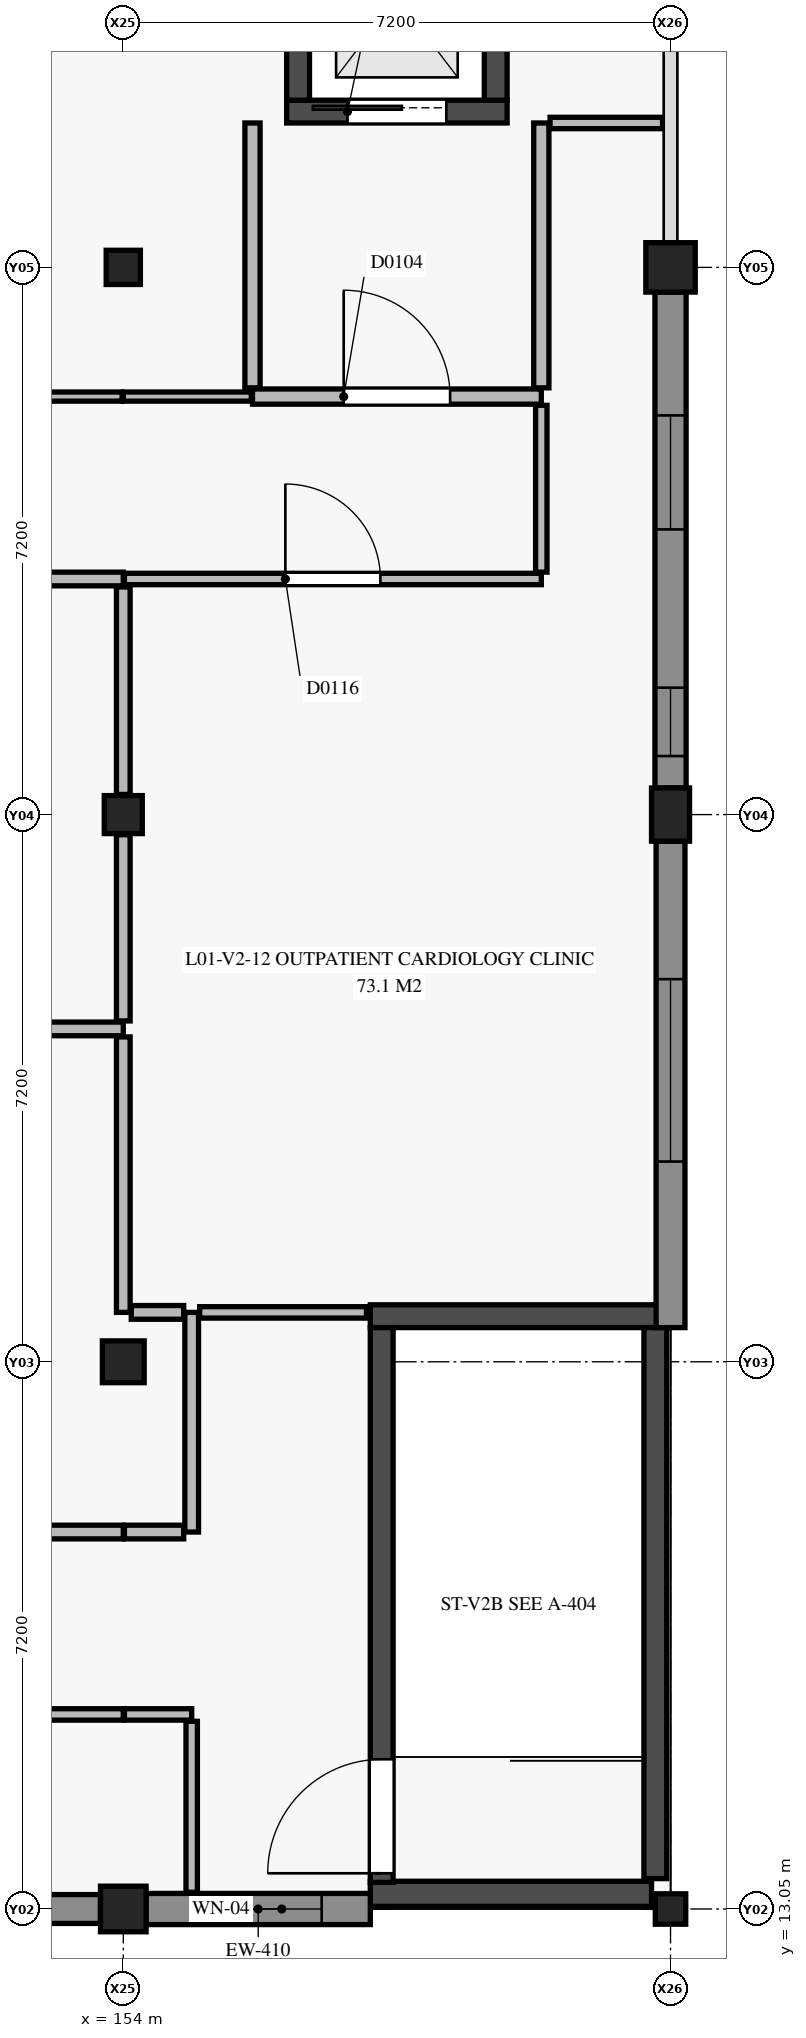
"""IFC4 building model, lengths in metres.
Left out: names, types, materials, properties, quantities, classifications, styles, units other than length and angle.
Written with IfcOpenShell. Run it as: python <this file> out.ifc"""

import sys

from ifc_helpers import new_model, si_unit, direction, frame, frame_2d, origin, origin_2d, place, context, subcontext, project, spatial, rectangle, circle, extrude, element, fill, save


model = new_model("IFC4")
c1 = context("Model", 3, precision=1e-05, world=origin(), true_north=direction((0.0, 1.0)))
c2 = subcontext(c1, "Body", "Model", "MODEL_VIEW")
j1 = project(units=[si_unit("LENGTHUNIT", "METRE"), si_unit("PLANEANGLEUNIT", "RADIAN")], contexts=[c1])
p1 = place(None, origin())
s1 = spatial("IfcSite", under=j1, at=p1, CompositionType="ELEMENT")
p2 = place(p1, origin())
s2 = spatial("IfcBuilding", under=s1, at=p2, CompositionType="ELEMENT")
p3 = place(p2, frame((0.0, 0.0, 4.8)))
s3 = spatial("IfcBuildingStorey", under=s2, at=p3, CompositionType="ELEMENT", Elevation=4.8)
p4 = place(p3, frame((154.0, 13.05, 0.0), z_axis=(0.0, 0.0, 1.0), x_axis=(1.0, 0.0, 0.0)))
e1 = element("IfcColumn", 1, at=p4, inside=s3, PredefinedType="COLUMN", context=c2, shape_type="SweptSolid", body=[
    extrude(rectangle(XDim=0.6, YDim=0.6, at=origin_2d()), origin(), (0.0, 0.0, 1.0), 4.36),
])
p5 = place(p3, frame((154.0, 20.25, 0.0), z_axis=(0.0, 0.0, 1.0), x_axis=(1.0, 0.0, 0.0)))
e2 = element("IfcColumn", 2, at=p5, inside=s3, PredefinedType="COLUMN", context=c2, shape_type="SweptSolid", body=[
    extrude(rectangle(XDim=0.55, YDim=0.55, at=origin_2d()), origin(), (0.0, 0.0, 1.0), 4.05),
])
p6 = place(p3, frame((154.0, 27.45, 0.0), z_axis=(0.0, 0.0, 1.0), x_axis=(1.0, 0.0, 0.0)))
e3 = element("IfcColumn", 3, at=p6, inside=s3, PredefinedType="COLUMN", context=c2, shape_type="SweptSolid", body=[
    extrude(rectangle(XDim=0.5, YDim=0.5, at=origin_2d()), origin(), (0.0, 0.0, 1.0), 4.05),
])
p7 = place(p3, frame((154.0, 34.65, 0.0), z_axis=(0.0, 0.0, 1.0), x_axis=(1.0, 0.0, 0.0)))
e4 = element("IfcColumn", 4, at=p7, inside=s3, PredefinedType="COLUMN", context=c2, shape_type="SweptSolid", body=[
    extrude(rectangle(XDim=0.45, YDim=0.45, at=origin_2d()), origin(), (0.0, 0.0, 1.0), 4.05),
])
p8 = place(p3, frame((161.2, 27.45, 0.0), z_axis=(0.0, 0.0, 1.0), x_axis=(1.0, 0.0, 0.0)))
e5 = element("IfcColumn", 5, at=p8, inside=s3, PredefinedType="COLUMN", context=c2, shape_type="SweptSolid", body=[
    extrude(rectangle(XDim=0.5, YDim=0.7, at=origin_2d()), origin(), (0.0, 0.0, 1.0), 4.05),
])
p9 = place(p3, frame((161.2, 34.65, 0.0), z_axis=(0.0, 0.0, 1.0), x_axis=(1.0, 0.0, 0.0)))
e6 = element("IfcColumn", 6, at=p9, inside=s3, PredefinedType="COLUMN", context=c2, shape_type="SweptSolid", body=[
    extrude(circle(Radius=0.325, at=origin_2d()), origin(), (0.0, 0.0, 1.0), 4.05),
])
p10 = place(p3, frame((161.2, 13.05, 0.0), z_axis=(0.0, 0.0, 1.0), x_axis=(1.0, 0.0, 0.0)))
e7 = element("IfcColumn", 7, at=p10, inside=s3, PredefinedType="COLUMN", context=c2, shape_type="SweptSolid", body=[
    extrude(rectangle(XDim=0.4, YDim=0.4, at=origin_2d()), origin(), (0.0, 0.0, 1.0), 4.36),
])
p11 = place(p3, frame((157.25, 13.25, 0.0), z_axis=(0.0, 0.0, 1.0), x_axis=(1.0, 0.0, 0.0)))
e8 = element("IfcWall", 8, at=p11, inside=s3, PredefinedType="SHEAR", context=c2, shape_type="SweptSolid", body=[
    extrude(rectangle(XDim=3.7, YDim=0.33, at=frame_2d((1.85, 0.0))), origin(), (0.0, 0.0, 1.0), 4.2),
])
p12 = place(p3, frame((157.25, 20.85, 0.0), z_axis=(0.0, 0.0, 1.0), x_axis=(1.0, 0.0, 0.0)))
e9 = element("IfcWall", 9, at=p12, inside=s3, PredefinedType="SHEAR", context=c2, shape_type="SweptSolid", body=[
    extrude(rectangle(XDim=3.9, YDim=0.3, at=frame_2d((1.95, 0.0))), origin(), (0.0, 0.0, 1.0), 4.2),
])
p13 = place(p3, frame((157.4, 13.4, 0.0), z_axis=(0.0, 0.0, 1.0), x_axis=(0.0, 1.0, 0.0)))
e10 = element("IfcWall", 10, at=p13, inside=s3, PredefinedType="SHEAR", context=c2, shape_type="SweptSolid", body=[
    extrude(rectangle(XDim=7.3, YDim=0.3, at=frame_2d((3.65, 0.0))), origin(), (0.0, 0.0, 1.0), 4.2),
])
p14 = place(p13, frame((0.12, 0.0, 0.0)))
e11 = element("IfcOpeningElement", 11, at=p14, cuts=e10, PredefinedType="OPENING", context=c2, shape_type="SweptSolid", body=[
    extrude(rectangle(XDim=1.5, YDim=2.15, at=frame_2d((0.75, 1.075))), frame((0.0, 0.16, 0.0), z_axis=(0.0, -1.0, 0.0), x_axis=(1.0, 0.0, 0.0)), (0.0, 0.0, 1.0), 0.32),
])
p15 = place(p3, frame((161.0, 13.45, 0.0), z_axis=(0.0, 0.0, 1.0), x_axis=(0.0, 1.0, 0.0)))
e12 = element("IfcWall", 12, at=p15, inside=s3, PredefinedType="SHEAR", context=c2, shape_type="SweptSolid", body=[
    extrude(rectangle(XDim=7.25, YDim=0.3, at=frame_2d((3.625, 0.0))), origin(), (0.0, 0.0, 1.0), 4.2),
])
p16 = place(p3, frame((156.15, 36.7, 0.0), z_axis=(0.0, 0.0, 1.0), x_axis=(1.0, 0.0, 0.0)))
e13 = element("IfcWall", 13, at=p16, inside=s3, PredefinedType="SHEAR", context=c2, shape_type="SweptSolid", body=[
    extrude(rectangle(XDim=2.9, YDim=0.3, at=frame_2d((1.45, 0.0))), origin(), (0.0, 0.0, 1.0), 3.95),
])
p17 = place(p16, frame((0.8, 0.0, 0.0)))
e14 = element("IfcOpeningElement", 14, at=p17, cuts=e13, PredefinedType="OPENING", context=c2, shape_type="SweptSolid", body=[
    extrude(rectangle(XDim=1.3, YDim=2.15, at=frame_2d((0.65, 1.075))), frame((0.0, 0.16, 0.0), z_axis=(0.0, -1.0, 0.0), x_axis=(1.0, 0.0, 0.0)), (0.0, 0.0, 1.0), 0.32),
])
for number, where, z_axis, x_axis in (
    (15, (156.3, 36.85, 0.0), (0.0, 0.0, 1.0), (0.0, 1.0, 0.0)),
    (16, (158.9, 36.85, 0.0), (0.0, 0.0, 1.0), (0.0, 1.0, 0.0)),
):
    element("IfcWall", number, at=place(p3, frame(where, z_axis=z_axis, x_axis=x_axis)), inside=s3, PredefinedType="SHEAR", context=c2, shape_type="SweptSolid", body=[
        extrude(rectangle(XDim=2.7, YDim=0.3, at=frame_2d((1.35, 0.0))), origin(), (0.0, 0.0, 1.0), 3.95),
    ])
p18 = place(p3, frame((157.25, 13.05, 0.0), z_axis=(0.0, 0.0, 1.0), x_axis=(-1.0, 0.0, 0.0)))
e17 = element("IfcWall", 17, at=p18, inside=s3, PredefinedType="USERDEFINED", context=c2, shape_type="SweptSolid", body=[
    extrude(rectangle(XDim=2.95, YDim=0.41, at=frame_2d((1.475, 0.0))), origin(), (0.0, 0.0, 1.0), 3.38),
])
p19 = place(p18, frame((0.64, 0.0, 0.9)))
e18 = element("IfcOpeningElement", 18, at=p19, cuts=e17, PredefinedType="OPENING", context=c2, shape_type="SweptSolid", body=[
    extrude(rectangle(XDim=1.05, YDim=1.8, at=frame_2d((0.525, 0.9))), frame((0.0, 0.215, 0.0), z_axis=(0.0, -1.0, 0.0), x_axis=(1.0, 0.0, 0.0)), (0.0, 0.0, 1.0), 0.43),
])
p20 = place(p3, frame((153.7, 13.05, 0.0), z_axis=(0.0, 0.0, 1.0), x_axis=(-1.0, 0.0, 0.0)))
e19 = element("IfcWall", 19, at=p20, inside=s3, PredefinedType="USERDEFINED", context=c2, shape_type="SweptSolid", body=[
    extrude(rectangle(XDim=3.15, YDim=0.38, at=frame_2d((1.575, 0.0))), origin(), (0.0, 0.0, 1.0), 3.38),
])
p21 = place(p20, frame((0.79, 0.0, 0.9)))
e20 = element("IfcOpeningElement", 20, at=p21, cuts=e19, PredefinedType="OPENING", context=c2, shape_type="SweptSolid", body=[
    extrude(rectangle(XDim=1.2, YDim=1.8, at=frame_2d((0.6, 0.9))), frame((0.0, 0.2, 0.0), z_axis=(0.0, -1.0, 0.0), x_axis=(1.0, 0.0, 0.0)), (0.0, 0.0, 1.0), 0.4),
])
p22 = place(p3, frame((161.2, 34.325, 0.0), z_axis=(0.0, 0.0, 1.0), x_axis=(0.0, -1.0, 0.0)))
e21 = element("IfcWall", 21, at=p22, inside=s3, PredefinedType="USERDEFINED", context=c2, shape_type="SweptSolid", body=[
    extrude(rectangle(XDim=6.525, YDim=0.41, at=frame_2d((3.262, 0.0))), origin(), (0.0, 0.0, 1.0), 3.38),
])
p23 = place(p22, frame((1.623, 0.0, 0.9)))
e22 = element("IfcOpeningElement", 22, at=p23, cuts=e21, PredefinedType="OPENING", context=c2, shape_type="SweptSolid", body=[
    extrude(rectangle(XDim=1.5, YDim=1.5, at=frame_2d((0.75, 0.75))), frame((0.0, 0.215, 0.0), z_axis=(0.0, -1.0, 0.0), x_axis=(1.0, 0.0, 0.0)), (0.0, 0.0, 1.0), 0.43),
])
p24 = place(p22, frame((5.205, 0.0, 0.95)))
e23 = element("IfcOpeningElement", 23, at=p24, cuts=e21, PredefinedType="OPENING", context=c2, shape_type="SweptSolid", body=[
    extrude(rectangle(XDim=0.9, YDim=1.2, at=frame_2d((0.45, 0.6))), frame((0.0, 0.215, 0.0), z_axis=(0.0, -1.0, 0.0), x_axis=(1.0, 0.0, 0.0)), (0.0, 0.0, 1.0), 0.43),
])
p25 = place(p3, frame((161.2, 27.1, 0.0), z_axis=(0.0, 0.0, 1.0), x_axis=(0.0, -1.0, 0.0)))
e24 = element("IfcWall", 24, at=p25, inside=s3, PredefinedType="USERDEFINED", context=c2, shape_type="SweptSolid", body=[
    extrude(rectangle(XDim=6.4, YDim=0.38, at=frame_2d((3.2, 0.0))), origin(), (0.0, 0.0, 1.0), 3.38),
])
p26 = place(p25, frame((1.815, 0.0, 0.9)))
e25 = element("IfcOpeningElement", 25, at=p26, cuts=e24, PredefinedType="OPENING", context=c2, shape_type="SweptSolid", body=[
    extrude(rectangle(XDim=2.4, YDim=1.5, at=frame_2d((1.2, 0.75))), frame((0.0, 0.2, 0.0), z_axis=(0.0, -1.0, 0.0), x_axis=(1.0, 0.0, 0.0)), (0.0, 0.0, 1.0), 0.4),
])
p27 = place(p3, frame((155.7, 32.95, 0.0), z_axis=(0.0, 0.0, 1.0), x_axis=(1.0, 0.0, 0.0)))
e26 = element("IfcWall", 26, at=p27, inside=s3, PredefinedType="PARTITIONING", context=c2, shape_type="SweptSolid", body=[
    extrude(rectangle(XDim=3.8, YDim=0.2, at=frame_2d((1.9, 0.0))), origin(), (0.0, 0.0, 1.0), 3.95),
])
p28 = place(p27, frame((1.2, 0.0, 0.0)))
e27 = element("IfcOpeningElement", 27, at=p28, cuts=e26, PredefinedType="OPENING", context=c2, shape_type="SweptSolid", body=[
    extrude(rectangle(XDim=1.4, YDim=2.2, at=frame_2d((0.7, 1.1))), frame((0.0, 0.11, 0.0), z_axis=(0.0, -1.0, 0.0), x_axis=(1.0, 0.0, 0.0)), (0.0, 0.0, 1.0), 0.22),
])
for number, where, z_axis, x_axis in (
    (28, (159.5, 33.065, 0.0), (0.0, 0.0, 1.0), (0.0, 1.0, 0.0)),
    (29, (155.7, 33.065, 0.0), (0.0, 0.0, 1.0), (0.0, 1.0, 0.0)),
):
    element("IfcWall", number, at=place(p3, frame(where, z_axis=z_axis, x_axis=x_axis)), inside=s3, PredefinedType="PARTITIONING", context=c2, shape_type="SweptSolid", body=[
        extrude(rectangle(XDim=3.485, YDim=0.2, at=frame_2d((1.743, 0.0))), origin(), (0.0, 0.0, 1.0), 3.47),
    ])
p29 = place(p3, frame((151.6, 18.01, 0.0), z_axis=(0.0, 0.0, 1.0), x_axis=(1.0, 0.0, 0.0)))
e30 = element("IfcWall", 30, at=p29, inside=s3, PredefinedType="PLUMBINGWALL", context=c2, shape_type="SweptSolid", body=[
    extrude(rectangle(XDim=2.4, YDim=0.18, at=frame_2d((1.2, 0.0))), origin(), (0.0, 0.0, 1.0), 3.95),
])
p30 = place(p3, frame((154.9, 18.01, 0.0), z_axis=(0.0, 0.0, 1.0), x_axis=(0.0, 1.0, 0.0)))
e31 = element("IfcWall", 31, at=p30, inside=s3, PredefinedType="PLUMBINGWALL", context=c2, shape_type="SweptSolid", body=[
    extrude(rectangle(XDim=2.89, YDim=0.18, at=frame_2d((1.445, 0.0))), origin(), (0.0, 0.0, 1.0), 3.95),
])
p31 = place(p3, frame((154.015, 18.01, 0.0), z_axis=(0.0, 0.0, 1.0), x_axis=(1.0, 0.0, 0.0)))
e32 = element("IfcWall", 32, at=p31, inside=s3, PredefinedType="PLUMBINGWALL", context=c2, shape_type="SweptSolid", body=[
    extrude(rectangle(XDim=0.78, YDim=0.18, at=frame_2d((0.39, 0.0))), origin(), (0.0, 0.0, 1.0), 3.95),
])
p32 = place(p3, frame((151.705, 30.55, 0.0), z_axis=(0.0, 0.0, 1.0), x_axis=(1.0, 0.0, 0.0)))
e33 = element("IfcWall", 33, at=p32, inside=s3, PredefinedType="PLUMBINGWALL", context=c2, shape_type="SweptSolid", body=[
    extrude(rectangle(XDim=2.295, YDim=0.18, at=frame_2d((1.147, 0.0))), origin(), (0.0, 0.0, 1.0), 3.95),
])
p33 = place(p3, frame((150.915, 15.61, 0.0), z_axis=(0.0, 0.0, 1.0), x_axis=(1.0, 0.0, 0.0)))
e34 = element("IfcWall", 34, at=p33, inside=s3, PredefinedType="PARTITIONING", context=c2, shape_type="SweptSolid", body=[
    extrude(rectangle(XDim=3.085, YDim=0.15, at=frame_2d((1.542, 0.0))), origin(), (0.0, 0.0, 1.0), 3.95),
])
p34 = place(p3, frame((154.015, 15.61, 0.0), z_axis=(0.0, 0.0, 1.0), x_axis=(1.0, 0.0, 0.0)))
e35 = element("IfcWall", 35, at=p34, inside=s3, PredefinedType="PARTITIONING", context=c2, shape_type="SweptSolid", body=[
    extrude(rectangle(XDim=0.885, YDim=0.15, at=frame_2d((0.442, 0.0))), origin(), (0.0, 0.0, 1.0), 3.95),
])
p35 = place(p3, frame((154.9, 13.27, 0.0), z_axis=(0.0, 0.0, 1.0), x_axis=(0.0, 1.0, 0.0)))
e36 = element("IfcWall", 36, at=p35, inside=s3, PredefinedType="PARTITIONING", context=c2, shape_type="SweptSolid", body=[
    extrude(rectangle(XDim=2.25, YDim=0.15, at=frame_2d((1.125, 0.0))), origin(), (0.0, 0.0, 1.0), 3.95),
])
p36 = place(p3, frame((155.005, 20.9, 0.0), z_axis=(0.0, 0.0, 1.0), x_axis=(1.0, 0.0, 0.0)))
e37 = element("IfcWall", 37, at=p36, inside=s3, PredefinedType="PARTITIONING", context=c2, shape_type="SweptSolid", body=[
    extrude(rectangle(XDim=2.195, YDim=0.15, at=frame_2d((1.098, 0.0))), origin(), (0.0, 0.0, 1.0), 3.95),
])
p37 = place(p3, frame((154.015, 30.55, 0.0), z_axis=(0.0, 0.0, 1.0), x_axis=(1.0, 0.0, 0.0)))
e38 = element("IfcWall", 38, at=p37, inside=s3, PredefinedType="PARTITIONING", context=c2, shape_type="SweptSolid", body=[
    extrude(rectangle(XDim=5.485, YDim=0.15, at=frame_2d((2.743, 0.0))), origin(), (0.0, 0.0, 1.0), 3.95),
])
p38 = place(p37, frame((2.117, 0.0, 0.0)))
e39 = element("IfcOpeningElement", 39, at=p38, cuts=e38, PredefinedType="OPENING", context=c2, shape_type="SweptSolid", body=[
    extrude(rectangle(XDim=1.25, YDim=2.15, at=frame_2d((0.625, 1.075))), frame((0.0, 0.085, 0.0), z_axis=(0.0, -1.0, 0.0), x_axis=(1.0, 0.0, 0.0)), (0.0, 0.0, 1.0), 0.17),
])
p39 = place(p3, frame((159.5, 30.64, 0.0), z_axis=(0.0, 0.0, 1.0), x_axis=(0.0, 1.0, 0.0)))
e40 = element("IfcWall", 40, at=p39, inside=s3, PredefinedType="PARTITIONING", context=c2, shape_type="SweptSolid", body=[
    extrude(rectangle(XDim=2.195, YDim=0.15, at=frame_2d((1.098, 0.0))), origin(), (0.0, 0.0, 1.0), 3.95),
])
p40 = place(p3, frame((154.0, 32.95, 0.0), z_axis=(0.0, 0.0, 1.0), x_axis=(1.0, 0.0, 0.0)))
e41 = element("IfcWall", 41, at=p40, inside=s3, PredefinedType="PARTITIONING", context=c2, shape_type="SweptSolid", body=[
    extrude(rectangle(XDim=1.685, YDim=0.12, at=frame_2d((0.843, 0.0))), origin(), (0.0, 0.0, 1.0), 3.95),
])
p41 = place(p3, frame((150.915, 32.95, 0.0), z_axis=(0.0, 0.0, 1.0), x_axis=(1.0, 0.0, 0.0)))
e42 = element("IfcWall", 42, at=p41, inside=s3, PredefinedType="PARTITIONING", context=c2, shape_type="SweptSolid", body=[
    extrude(rectangle(XDim=3.07, YDim=0.12, at=frame_2d((1.535, 0.0))), origin(), (0.0, 0.0, 1.0), 3.95),
])
p42 = place(p41, frame((0.96, 0.0, 0.0)))
e43 = element("IfcOpeningElement", 43, at=p42, cuts=e42, PredefinedType="OPENING", context=c2, shape_type="SweptSolid", body=[
    extrude(rectangle(XDim=1.15, YDim=2.15, at=frame_2d((0.575, 1.075))), frame((0.0, 0.07, 0.0), z_axis=(0.0, -1.0, 0.0), x_axis=(1.0, 0.0, 0.0)), (0.0, 0.0, 1.0), 0.14),
])
p43 = place(p3, frame((151.705, 24.63, 0.0), z_axis=(0.0, 0.0, 1.0), x_axis=(1.0, 0.0, 0.0)))
e44 = element("IfcWall", 44, at=p43, inside=s3, PredefinedType="PLUMBINGWALL", context=c2, shape_type="SweptSolid", body=[
    extrude(rectangle(XDim=2.295, YDim=0.18, at=frame_2d((1.147, 0.0))), origin(), (0.0, 0.0, 1.0), 3.95),
])
p44 = place(p3, frame((154.0, 20.9, 0.0), z_axis=(0.0, 0.0, 1.0), x_axis=(0.0, 1.0, 0.0)))
e45 = element("IfcWall", 45, at=p44, inside=s3, PredefinedType="PLUMBINGWALL", context=c2, shape_type="SweptSolid", body=[
    extrude(rectangle(XDim=3.625, YDim=0.18, at=frame_2d((1.812, 0.0))), origin(), (0.0, 0.0, 1.0), 3.95),
])
p45 = place(p3, frame((154.105, 20.9, 0.0), z_axis=(0.0, 0.0, 1.0), x_axis=(1.0, 0.0, 0.0)))
e46 = element("IfcWall", 46, at=p45, inside=s3, PredefinedType="PLUMBINGWALL", context=c2, shape_type="SweptSolid", body=[
    extrude(rectangle(XDim=0.69, YDim=0.18, at=frame_2d((0.345, 0.0))), origin(), (0.0, 0.0, 1.0), 3.95),
])
p46 = place(p3, frame((154.0, 24.735, 0.0), z_axis=(0.0, 0.0, 1.0), x_axis=(0.0, 1.0, 0.0)))
e47 = element("IfcWall", 47, at=p46, inside=s3, PredefinedType="PLUMBINGWALL", context=c2, shape_type="SweptSolid", body=[
    extrude(rectangle(XDim=2.45, YDim=0.18, at=frame_2d((1.225, 0.0))), origin(), (0.0, 0.0, 1.0), 3.95),
])
p47 = place(p3, frame((154.0, 27.715, 0.0), z_axis=(0.0, 0.0, 1.0), x_axis=(0.0, 1.0, 0.0)))
e48 = element("IfcWall", 48, at=p47, inside=s3, PredefinedType="PLUMBINGWALL", context=c2, shape_type="SweptSolid", body=[
    extrude(rectangle(XDim=2.73, YDim=0.18, at=frame_2d((1.365, 0.0))), origin(), (0.0, 0.0, 1.0), 3.95),
])
p48 = place(p3, frame((159.615, 36.55, 0.0), z_axis=(0.0, 0.0, 1.0), x_axis=(1.0, 0.0, 0.0)))
e49 = element("IfcWall", 49, at=p48, inside=s3, PredefinedType="PARTITIONING", context=c2, shape_type="SweptSolid", body=[
    extrude(rectangle(XDim=1.48, YDim=0.15, at=frame_2d((0.74, 0.0))), origin(), (0.0, 0.0, 1.0), 3.95),
])
p49 = place(p19, origin())
e50 = element("IfcWindow", 50, at=p49, inside=s3, PartitioningType="SINGLE_PANEL", PredefinedType="WINDOW", context=c2, shape_type="SweptSolid", body=[
    extrude(rectangle(XDim=1.05, YDim=1.8, at=frame_2d((0.525, 0.9))), frame((0.0, 0.03, 0.0), z_axis=(0.0, -1.0, 0.0), x_axis=(1.0, 0.0, 0.0)), (0.0, 0.0, 1.0), 0.06),
])
fill(e18, e50)
p50 = place(p23, origin())
e51 = element("IfcWindow", 51, at=p50, inside=s3, PartitioningType="SINGLE_PANEL", PredefinedType="WINDOW", context=c2, shape_type="SweptSolid", body=[
    extrude(rectangle(XDim=1.5, YDim=1.5, at=frame_2d((0.75, 0.75))), frame((0.0, 0.03, 0.0), z_axis=(0.0, -1.0, 0.0), x_axis=(1.0, 0.0, 0.0)), (0.0, 0.0, 1.0), 0.06),
])
fill(e22, e51)
p51 = place(p24, origin())
e52 = element("IfcWindow", 52, at=p51, inside=s3, PartitioningType="SINGLE_PANEL", PredefinedType="WINDOW", context=c2, shape_type="SweptSolid", body=[
    extrude(rectangle(XDim=0.9, YDim=1.2, at=frame_2d((0.45, 0.6))), frame((0.0, 0.03, 0.0), z_axis=(0.0, -1.0, 0.0), x_axis=(1.0, 0.0, 0.0)), (0.0, 0.0, 1.0), 0.06),
])
fill(e23, e52)
p52 = place(p26, origin())
e53 = element("IfcWindow", 53, at=p52, inside=s3, PartitioningType="SINGLE_PANEL", PredefinedType="WINDOW", context=c2, shape_type="SweptSolid", body=[
    extrude(rectangle(XDim=2.4, YDim=1.5, at=frame_2d((1.2, 0.75))), frame((0.0, 0.03, 0.0), z_axis=(0.0, -1.0, 0.0), x_axis=(1.0, 0.0, 0.0)), (0.0, 0.0, 1.0), 0.06),
])
fill(e25, e53)
p53 = place(p14, origin())
e54 = element("IfcDoor", 54, at=p53, inside=s3, OperationType="SINGLE_SWING_LEFT", PredefinedType="DOOR", context=c2, shape_type="SweptSolid", body=[
    extrude(rectangle(XDim=1.5, YDim=2.15, at=frame_2d((0.75, 1.075))), frame((0.0, 0.025, 0.0), z_axis=(0.0, -1.0, 0.0), x_axis=(1.0, 0.0, 0.0)), (0.0, 0.0, 1.0), 0.05),
])
fill(e11, e54)
p54 = place(p17, origin())
e55 = element("IfcDoor", 55, at=p54, inside=s3, OperationType="SLIDING_TO_LEFT", PredefinedType="DOOR", context=c2, shape_type="SweptSolid", body=[
    extrude(rectangle(XDim=1.3, YDim=2.15, at=frame_2d((0.65, 1.075))), frame((0.0, 0.025, 0.0), z_axis=(0.0, -1.0, 0.0), x_axis=(1.0, 0.0, 0.0)), (0.0, 0.0, 1.0), 0.05),
])
fill(e14, e55)
p55 = place(p28, origin())
e56 = element("IfcDoor", 56, at=p55, inside=s3, OperationType="SINGLE_SWING_LEFT", PredefinedType="DOOR", context=c2, shape_type="SweptSolid", body=[
    extrude(rectangle(XDim=1.4, YDim=2.2, at=frame_2d((0.7, 1.1))), frame((0.0, 0.025, 0.0), z_axis=(0.0, -1.0, 0.0), x_axis=(1.0, 0.0, 0.0)), (0.0, 0.0, 1.0), 0.05),
])
fill(e27, e56)
p56 = place(p38, origin())
e57 = element("IfcDoor", 57, at=p56, inside=s3, OperationType="SINGLE_SWING_LEFT", PredefinedType="DOOR", context=c2, shape_type="SweptSolid", body=[
    extrude(rectangle(XDim=1.25, YDim=2.15, at=frame_2d((0.625, 1.075))), frame((0.0, 0.025, 0.0), z_axis=(0.0, -1.0, 0.0), x_axis=(1.0, 0.0, 0.0)), (0.0, 0.0, 1.0), 0.05),
])
fill(e39, e57)
save(model, sys.argv[1])
